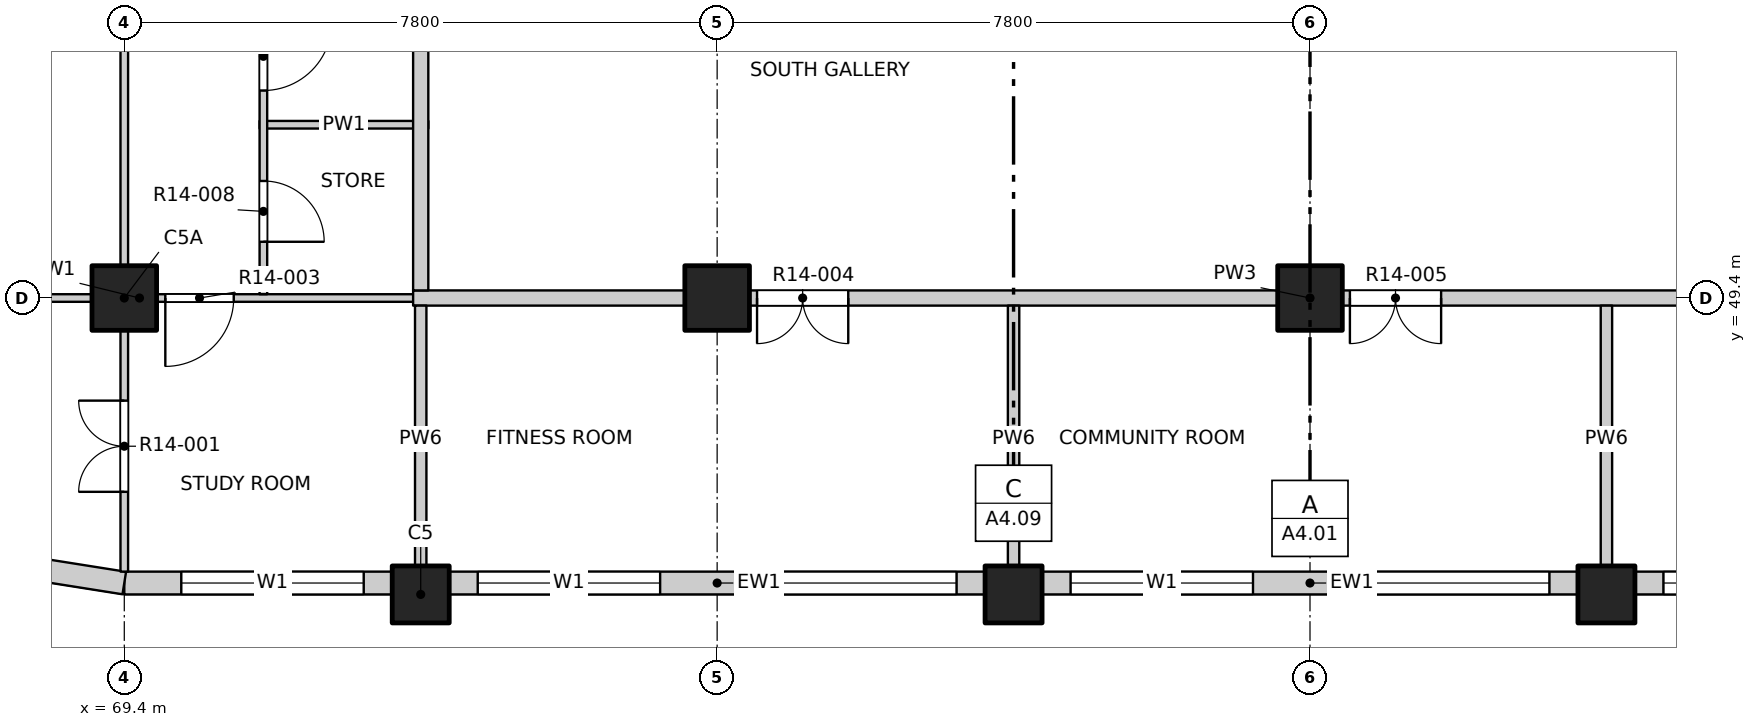
"""IFC4 building model, lengths in metres.
Left out: names, types, materials, properties, quantities, classifications, styles, units other than length and angle.
Written with IfcOpenShell. Run it as: python <this file> out.ifc"""

import sys

from ifc_helpers import new_model, si_unit, direction, frame, frame_2d, origin, origin_2d, place, context, subcontext, project, spatial, rectangle, extrude, element, fill, save


model = new_model("IFC4")
c1 = context("Model", 3, precision=1e-05, world=origin(), true_north=direction((0.0, 1.0)))
c2 = subcontext(c1, "Body", "Model", "MODEL_VIEW")
j1 = project(units=[si_unit("LENGTHUNIT", "METRE"), si_unit("PLANEANGLEUNIT", "RADIAN")], contexts=[c1])
p1 = place(None, origin())
s1 = spatial("IfcSite", under=j1, at=p1, CompositionType="ELEMENT")
p2 = place(p1, origin())
s2 = spatial("IfcBuilding", under=s1, at=p2, CompositionType="ELEMENT")
p3 = place(p2, frame((0.0, 0.0, 155.4)))
s3 = spatial("IfcBuildingStorey", under=s2, at=p3, CompositionType="ELEMENT", Elevation=155.4)
for number, where, z_axis, x_axis in (
    (1, (73.3, 45.5, -0.25), (0.0, 0.0, 1.0), (1.0, 0.0, 0.0)),
    (2, (81.1, 45.5, -0.25), (0.0, 0.0, 1.0), (1.0, 0.0, 0.0)),
    (3, (88.9, 45.5, -0.25), (0.0, 0.0, 1.0), (1.0, 0.0, 0.0)),
):
    element("IfcColumn", number, at=place(p3, frame(where, z_axis=z_axis, x_axis=x_axis)), inside=s3, PredefinedType="COLUMN", context=c2, shape_type="SweptSolid", body=[
        extrude(rectangle(XDim=0.75, YDim=0.75, at=origin_2d()), origin(), (0.0, 0.0, 1.0), 3.4),
    ])
for number, where, z_axis, x_axis in (
    (4, (69.4, 49.4, -0.25), (0.0, 0.0, 1.0), (1.0, 0.0, 0.0)),
    (5, (77.2, 49.4, -0.25), (0.0, 0.0, 1.0), (1.0, 0.0, 0.0)),
    (6, (85.0, 49.4, -0.25), (0.0, 0.0, 1.0), (1.0, 0.0, 0.0)),
):
    element("IfcColumn", number, at=place(p3, frame(where, z_axis=z_axis, x_axis=x_axis)), inside=s3, PredefinedType="COLUMN", context=c2, shape_type="SweptSolid", body=[
        extrude(rectangle(XDim=0.85, YDim=0.85, at=origin_2d()), origin(), (0.0, 0.0, 1.0), 3.4),
    ])
p4 = place(p3, frame((69.4, 45.65, 0.0), z_axis=(0.0, 0.0, 1.0), x_axis=(1.0, 0.0, 0.0)))
e7 = element("IfcWall", 7, at=p4, inside=s3, PredefinedType="SOLIDWALL", context=c2, shape_type="SweptSolid", body=[
    extrude(rectangle(XDim=3.525, YDim=0.3, at=frame_2d((1.763, 0.0))), origin(), (0.0, 0.0, 1.0), 2.7),
])
p5 = place(p4, frame((0.75, 0.0, 0.9)))
e8 = element("IfcOpeningElement", 8, at=p5, cuts=e7, PredefinedType="OPENING", context=c2, shape_type="SweptSolid", body=[
    extrude(rectangle(XDim=2.4, YDim=1.8, at=frame_2d((1.2, 0.9))), frame((0.0, 0.16, 0.0), z_axis=(0.0, -1.0, 0.0), x_axis=(1.0, 0.0, 0.0)), (0.0, 0.0, 1.0), 0.32),
])
p6 = place(p3, frame((73.675, 45.65, 0.0), z_axis=(0.0, 0.0, 1.0), x_axis=(1.0, 0.0, 0.0)))
e9 = element("IfcWall", 9, at=p6, inside=s3, PredefinedType="SOLIDWALL", context=c2, shape_type="SweptSolid", body=[
    extrude(rectangle(XDim=7.05, YDim=0.3, at=frame_2d((3.525, 0.0))), origin(), (0.0, 0.0, 1.0), 2.7),
])
p7 = place(p6, frame((0.375, 0.0, 0.9)))
e10 = element("IfcOpeningElement", 10, at=p7, cuts=e9, PredefinedType="OPENING", context=c2, shape_type="SweptSolid", body=[
    extrude(rectangle(XDim=2.4, YDim=1.8, at=frame_2d((1.2, 0.9))), frame((0.0, 0.16, 0.0), z_axis=(0.0, -1.0, 0.0), x_axis=(1.0, 0.0, 0.0)), (0.0, 0.0, 1.0), 0.32),
])
p8 = place(p6, frame((4.275, 0.0, 0.9)))
e11 = element("IfcOpeningElement", 11, at=p8, cuts=e9, PredefinedType="OPENING", context=c2, shape_type="SweptSolid", body=[
    extrude(rectangle(XDim=2.4, YDim=1.8, at=frame_2d((1.2, 0.9))), frame((0.0, 0.16, 0.0), z_axis=(0.0, -1.0, 0.0), x_axis=(1.0, 0.0, 0.0)), (0.0, 0.0, 1.0), 0.32),
])
p9 = place(p3, frame((81.475, 45.65, 0.0), z_axis=(0.0, 0.0, 1.0), x_axis=(1.0, 0.0, 0.0)))
e12 = element("IfcWall", 12, at=p9, inside=s3, PredefinedType="SOLIDWALL", context=c2, shape_type="SweptSolid", body=[
    extrude(rectangle(XDim=7.05, YDim=0.3, at=frame_2d((3.525, 0.0))), origin(), (0.0, 0.0, 1.0), 2.7),
])
p10 = place(p9, frame((0.375, 0.0, 0.9)))
e13 = element("IfcOpeningElement", 13, at=p10, cuts=e12, PredefinedType="OPENING", context=c2, shape_type="SweptSolid", body=[
    extrude(rectangle(XDim=2.4, YDim=1.8, at=frame_2d((1.2, 0.9))), frame((0.0, 0.16, 0.0), z_axis=(0.0, -1.0, 0.0), x_axis=(1.0, 0.0, 0.0)), (0.0, 0.0, 1.0), 0.32),
])
p11 = place(p9, frame((4.275, 0.0, 0.9)))
e14 = element("IfcOpeningElement", 14, at=p11, cuts=e12, PredefinedType="OPENING", context=c2, shape_type="SweptSolid", body=[
    extrude(rectangle(XDim=2.4, YDim=1.8, at=frame_2d((1.2, 0.9))), frame((0.0, 0.16, 0.0), z_axis=(0.0, -1.0, 0.0), x_axis=(1.0, 0.0, 0.0)), (0.0, 0.0, 1.0), 0.32),
])
p12 = place(p3, frame((89.275, 45.65, 0.0), z_axis=(0.0, 0.0, 1.0), x_axis=(1.0, 0.0, 0.0)))
e15 = element("IfcWall", 15, at=p12, inside=s3, PredefinedType="SOLIDWALL", context=c2, shape_type="SweptSolid", body=[
    extrude(rectangle(XDim=7.05, YDim=0.3, at=frame_2d((3.525, 0.0))), origin(), (0.0, 0.0, 1.0), 2.7),
])
p13 = place(p12, frame((0.375, 0.0, 0.9)))
e16 = element("IfcOpeningElement", 16, at=p13, cuts=e15, PredefinedType="OPENING", context=c2, shape_type="SweptSolid", body=[
    extrude(rectangle(XDim=2.4, YDim=1.8, at=frame_2d((1.2, 0.9))), frame((0.0, 0.16, 0.0), z_axis=(0.0, -1.0, 0.0), x_axis=(1.0, 0.0, 0.0)), (0.0, 0.0, 1.0), 0.32),
])
p14 = place(p12, frame((4.275, 0.0, 0.9)))
e17 = element("IfcOpeningElement", 17, at=p14, cuts=e15, PredefinedType="OPENING", context=c2, shape_type="SweptSolid", body=[
    extrude(rectangle(XDim=2.4, YDim=1.8, at=frame_2d((1.2, 0.9))), frame((0.0, 0.16, 0.0), z_axis=(0.0, -1.0, 0.0), x_axis=(1.0, 0.0, 0.0)), (0.0, 0.0, 1.0), 0.32),
])
p15 = place(p3, frame((68.241, 45.833, 0.0), z_axis=(0.0, 0.0, 1.0), x_axis=(0.987678452879, -0.156496880861, 0.0)))
e18 = element("IfcWall", 18, at=p15, inside=s3, PredefinedType="SOLIDWALL", context=c2, shape_type="SweptSolid", body=[
    extrude(rectangle(XDim=1.173, YDim=0.3, at=frame_2d((0.586, 0.0))), origin(), (0.0, 0.0, 1.0), 2.7),
])
p16 = place(p3, frame((65.8, 49.4, 0.0), z_axis=(0.0, 0.0, 1.0), x_axis=(1.0, 0.0, 0.0)))
e19 = element("IfcWall", 19, at=p16, inside=s3, PredefinedType="PARTITIONING", context=c2, shape_type="SweptSolid", body=[
    extrude(rectangle(XDim=7.6, YDim=0.1, at=frame_2d((3.8, 0.0))), origin(), (0.0, 0.0, 1.0), 3.15),
])
p17 = place(p16, frame((4.14, 0.0, 0.0)))
e20 = element("IfcOpeningElement", 20, at=p17, cuts=e19, PredefinedType="OPENING", context=c2, shape_type="SweptSolid", body=[
    extrude(rectangle(XDim=0.9, YDim=2.1, at=frame_2d((0.45, 1.05))), frame((0.0, 0.06, 0.0), z_axis=(0.0, -1.0, 0.0), x_axis=(1.0, 0.0, 0.0)), (0.0, 0.0, 1.0), 0.12),
])
p18 = place(p3, frame((73.2, 49.4, 0.0), z_axis=(0.0, 0.0, 1.0), x_axis=(1.0, 0.0, 0.0)))
e21 = element("IfcWall", 21, at=p18, inside=s3, PredefinedType="PARTITIONING", context=c2, shape_type="SweptSolid", body=[
    extrude(rectangle(XDim=23.6, YDim=0.2, at=frame_2d((11.8, 0.0))), origin(), (0.0, 0.0, 1.0), 3.15),
])
p19 = place(p18, frame((4.525, 0.0, 0.0)))
e22 = element("IfcOpeningElement", 22, at=p19, cuts=e21, PredefinedType="OPENING", context=c2, shape_type="SweptSolid", body=[
    extrude(rectangle(XDim=1.2, YDim=2.1, at=frame_2d((0.6, 1.05))), frame((0.0, 0.11, 0.0), z_axis=(0.0, -1.0, 0.0), x_axis=(1.0, 0.0, 0.0)), (0.0, 0.0, 1.0), 0.22),
])
p20 = place(p18, frame((12.325, 0.0, 0.0)))
e23 = element("IfcOpeningElement", 23, at=p20, cuts=e21, PredefinedType="OPENING", context=c2, shape_type="SweptSolid", body=[
    extrude(rectangle(XDim=1.2, YDim=2.1, at=frame_2d((0.6, 1.05))), frame((0.0, 0.11, 0.0), z_axis=(0.0, -1.0, 0.0), x_axis=(1.0, 0.0, 0.0)), (0.0, 0.0, 1.0), 0.22),
])
p21 = place(p18, frame((20.125, 0.0, 0.0)))
e24 = element("IfcOpeningElement", 24, at=p21, cuts=e21, PredefinedType="OPENING", context=c2, shape_type="SweptSolid", body=[
    extrude(rectangle(XDim=1.2, YDim=2.1, at=frame_2d((0.6, 1.05))), frame((0.0, 0.11, 0.0), z_axis=(0.0, -1.0, 0.0), x_axis=(1.0, 0.0, 0.0)), (0.0, 0.0, 1.0), 0.22),
])
p22 = place(p3, frame((71.18, 51.68, 0.0), z_axis=(0.0, 0.0, 1.0), x_axis=(1.0, 0.0, 0.0)))
e25 = element("IfcWall", 25, at=p22, inside=s3, PredefinedType="PARTITIONING", context=c2, shape_type="SweptSolid", body=[
    extrude(rectangle(XDim=2.22, YDim=0.1, at=frame_2d((1.11, 0.0))), origin(), (0.0, 0.0, 1.0), 3.15),
])
p23 = place(p3, frame((69.4, 45.8, 0.0), z_axis=(0.0, 0.0, 1.0), x_axis=(0.0, 1.0, 0.0)))
e26 = element("IfcWall", 26, at=p23, inside=s3, PredefinedType="PARTITIONING", context=c2, shape_type="SweptSolid", body=[
    extrude(rectangle(XDim=38.4, YDim=0.1, at=frame_2d((19.2, 0.0))), origin(), (0.0, 0.0, 1.0), 3.15),
])
p24 = place(p23, frame((1.05, 0.0, 0.0)))
e27 = element("IfcOpeningElement", 27, at=p24, cuts=e26, PredefinedType="OPENING", context=c2, shape_type="SweptSolid", body=[
    extrude(rectangle(XDim=1.2, YDim=2.1, at=frame_2d((0.6, 1.05))), frame((0.0, 0.06, 0.0), z_axis=(0.0, -1.0, 0.0), x_axis=(1.0, 0.0, 0.0)), (0.0, 0.0, 1.0), 0.12),
])
p25 = place(p23, frame((6.9, 0.0, 0.0)))
e28 = element("IfcOpeningElement", 28, at=p25, cuts=e26, PredefinedType="OPENING", context=c2, shape_type="SweptSolid", body=[
    extrude(rectangle(XDim=1.2, YDim=2.1, at=frame_2d((0.6, 1.05))), frame((0.0, 0.06, 0.0), z_axis=(0.0, -1.0, 0.0), x_axis=(1.0, 0.0, 0.0)), (0.0, 0.0, 1.0), 0.12),
])
p26 = place(p23, frame((12.9, 0.0, 0.0)))
e29 = element("IfcOpeningElement", 29, at=p26, cuts=e26, PredefinedType="OPENING", context=c2, shape_type="SweptSolid", body=[
    extrude(rectangle(XDim=0.9, YDim=2.1, at=frame_2d((0.45, 1.05))), frame((0.0, 0.06, 0.0), z_axis=(0.0, -1.0, 0.0), x_axis=(1.0, 0.0, 0.0)), (0.0, 0.0, 1.0), 0.12),
])
p27 = place(p23, frame((16.8, 0.0, 0.0)))
e30 = element("IfcOpeningElement", 30, at=p27, cuts=e26, PredefinedType="OPENING", context=c2, shape_type="SweptSolid", body=[
    extrude(rectangle(XDim=0.9, YDim=2.1, at=frame_2d((0.45, 1.05))), frame((0.0, 0.06, 0.0), z_axis=(0.0, -1.0, 0.0), x_axis=(1.0, 0.0, 0.0)), (0.0, 0.0, 1.0), 0.12),
])
p28 = place(p23, frame((20.7, 0.0, 0.0)))
e31 = element("IfcOpeningElement", 31, at=p28, cuts=e26, PredefinedType="OPENING", context=c2, shape_type="SweptSolid", body=[
    extrude(rectangle(XDim=0.9, YDim=2.1, at=frame_2d((0.45, 1.05))), frame((0.0, 0.06, 0.0), z_axis=(0.0, -1.0, 0.0), x_axis=(1.0, 0.0, 0.0)), (0.0, 0.0, 1.0), 0.12),
])
p29 = place(p23, frame((24.6, 0.0, 0.0)))
e32 = element("IfcOpeningElement", 32, at=p29, cuts=e26, PredefinedType="OPENING", context=c2, shape_type="SweptSolid", body=[
    extrude(rectangle(XDim=0.9, YDim=2.1, at=frame_2d((0.45, 1.05))), frame((0.0, 0.06, 0.0), z_axis=(0.0, -1.0, 0.0), x_axis=(1.0, 0.0, 0.0)), (0.0, 0.0, 1.0), 0.12),
])
p30 = place(p23, frame((28.5, 0.0, 0.0)))
e33 = element("IfcOpeningElement", 33, at=p30, cuts=e26, PredefinedType="OPENING", context=c2, shape_type="SweptSolid", body=[
    extrude(rectangle(XDim=0.9, YDim=2.1, at=frame_2d((0.45, 1.05))), frame((0.0, 0.06, 0.0), z_axis=(0.0, -1.0, 0.0), x_axis=(1.0, 0.0, 0.0)), (0.0, 0.0, 1.0), 0.12),
])
p31 = place(p23, frame((32.4, 0.0, 0.0)))
e34 = element("IfcOpeningElement", 34, at=p31, cuts=e26, PredefinedType="OPENING", context=c2, shape_type="SweptSolid", body=[
    extrude(rectangle(XDim=0.9, YDim=2.1, at=frame_2d((0.45, 1.05))), frame((0.0, 0.06, 0.0), z_axis=(0.0, -1.0, 0.0), x_axis=(1.0, 0.0, 0.0)), (0.0, 0.0, 1.0), 0.12),
])
p32 = place(p23, frame((36.15, 0.0, 0.0)))
e35 = element("IfcOpeningElement", 35, at=p32, cuts=e26, PredefinedType="OPENING", context=c2, shape_type="SweptSolid", body=[
    extrude(rectangle(XDim=1.2, YDim=2.1, at=frame_2d((0.6, 1.05))), frame((0.0, 0.06, 0.0), z_axis=(0.0, -1.0, 0.0), x_axis=(1.0, 0.0, 0.0)), (0.0, 0.0, 1.0), 0.12),
])
p33 = place(p3, frame((71.23, 49.45, 0.0), z_axis=(0.0, 0.0, 1.0), x_axis=(0.0, 1.0, 0.0)))
e36 = element("IfcWall", 36, at=p33, inside=s3, PredefinedType="PARTITIONING", context=c2, shape_type="SweptSolid", body=[
    extrude(rectangle(XDim=8.85, YDim=0.1, at=frame_2d((4.425, 0.0))), origin(), (0.0, 0.0, 1.0), 3.15),
])
p34 = place(p33, frame((0.69, 0.0, 0.0)))
e37 = element("IfcOpeningElement", 37, at=p34, cuts=e36, PredefinedType="OPENING", context=c2, shape_type="SweptSolid", body=[
    extrude(rectangle(XDim=0.8, YDim=2.1, at=frame_2d((0.4, 1.05))), frame((0.0, 0.06, 0.0), z_axis=(0.0, -1.0, 0.0), x_axis=(1.0, 0.0, 0.0)), (0.0, 0.0, 1.0), 0.12),
])
p35 = place(p33, frame((2.68, 0.0, 0.0)))
e38 = element("IfcOpeningElement", 38, at=p35, cuts=e36, PredefinedType="OPENING", context=c2, shape_type="SweptSolid", body=[
    extrude(rectangle(XDim=0.9, YDim=2.1, at=frame_2d((0.45, 1.05))), frame((0.0, 0.06, 0.0), z_axis=(0.0, -1.0, 0.0), x_axis=(1.0, 0.0, 0.0)), (0.0, 0.0, 1.0), 0.12),
])
p36 = place(p33, frame((4.965, 0.0, 0.0)))
e39 = element("IfcOpeningElement", 39, at=p36, cuts=e36, PredefinedType="OPENING", context=c2, shape_type="SweptSolid", body=[
    extrude(rectangle(XDim=0.9, YDim=2.1, at=frame_2d((0.45, 1.05))), frame((0.0, 0.06, 0.0), z_axis=(0.0, -1.0, 0.0), x_axis=(1.0, 0.0, 0.0)), (0.0, 0.0, 1.0), 0.12),
])
p37 = place(p33, frame((7.4, 0.0, 0.0)))
e40 = element("IfcOpeningElement", 40, at=p37, cuts=e36, PredefinedType="OPENING", context=c2, shape_type="SweptSolid", body=[
    extrude(rectangle(XDim=0.9, YDim=2.1, at=frame_2d((0.45, 1.05))), frame((0.0, 0.06, 0.0), z_axis=(0.0, -1.0, 0.0), x_axis=(1.0, 0.0, 0.0)), (0.0, 0.0, 1.0), 0.12),
])
p38 = place(p3, frame((73.3, 45.8, 0.0), z_axis=(0.0, 0.0, 1.0), x_axis=(0.0, 1.0, 0.0)))
e41 = element("IfcWall", 41, at=p38, inside=s3, PredefinedType="PARTITIONING", context=c2, shape_type="SweptSolid", body=[
    extrude(rectangle(XDim=3.5, YDim=0.15, at=frame_2d((1.75, 0.0))), origin(), (0.0, 0.0, 1.0), 3.15),
])
p39 = place(p3, frame((73.3, 49.5, 0.0), z_axis=(0.0, 0.0, 1.0), x_axis=(0.0, 1.0, 0.0)))
e42 = element("IfcWall", 42, at=p39, inside=s3, PredefinedType="PARTITIONING", context=c2, shape_type="SweptSolid", body=[
    extrude(rectangle(XDim=34.7, YDim=0.2, at=frame_2d((17.35, 0.0))), origin(), (0.0, 0.0, 1.0), 3.15),
])
p40 = place(p39, frame((10.125, 0.0, 0.0)))
e43 = element("IfcOpeningElement", 43, at=p40, cuts=e42, PredefinedType="OPENING", context=c2, shape_type="SweptSolid", body=[
    extrude(rectangle(XDim=1.0, YDim=2.1, at=frame_2d((0.5, 1.05))), frame((0.0, 0.11, 0.0), z_axis=(0.0, -1.0, 0.0), x_axis=(1.0, 0.0, 0.0)), (0.0, 0.0, 1.0), 0.22),
])
p41 = place(p39, frame((14.575, 0.0, 0.0)))
e44 = element("IfcOpeningElement", 44, at=p41, cuts=e42, PredefinedType="OPENING", context=c2, shape_type="SweptSolid", body=[
    extrude(rectangle(XDim=1.0, YDim=2.1, at=frame_2d((0.5, 1.05))), frame((0.0, 0.11, 0.0), z_axis=(0.0, -1.0, 0.0), x_axis=(1.0, 0.0, 0.0)), (0.0, 0.0, 1.0), 0.22),
])
p42 = place(p39, frame((26.575, 0.0, 0.0)))
e45 = element("IfcOpeningElement", 45, at=p42, cuts=e42, PredefinedType="OPENING", context=c2, shape_type="SweptSolid", body=[
    extrude(rectangle(XDim=1.0, YDim=2.1, at=frame_2d((0.5, 1.05))), frame((0.0, 0.11, 0.0), z_axis=(0.0, -1.0, 0.0), x_axis=(1.0, 0.0, 0.0)), (0.0, 0.0, 1.0), 0.22),
])
for number, where, z_axis, x_axis in (
    (46, (81.1, 45.8, 0.0), (0.0, 0.0, 1.0), (0.0, 1.0, 0.0)),
    (47, (88.9, 45.8, 0.0), (0.0, 0.0, 1.0), (0.0, 1.0, 0.0)),
):
    element("IfcWall", number, at=place(p3, frame(where, z_axis=z_axis, x_axis=x_axis)), inside=s3, PredefinedType="PARTITIONING", context=c2, shape_type="SweptSolid", body=[
        extrude(rectangle(XDim=3.5, YDim=0.15, at=frame_2d((1.75, 0.0))), origin(), (0.0, 0.0, 1.0), 2.55),
    ])
p43 = place(p5, origin())
e48 = element("IfcWindow", 48, at=p43, inside=s3, PartitioningType="DOUBLE_PANEL_VERTICAL", PredefinedType="WINDOW", context=c2, shape_type="SweptSolid", body=[
    extrude(rectangle(XDim=2.4, YDim=1.8, at=frame_2d((1.2, 0.9))), frame((0.0, 0.03, 0.0), z_axis=(0.0, -1.0, 0.0), x_axis=(1.0, 0.0, 0.0)), (0.0, 0.0, 1.0), 0.06),
])
fill(e8, e48)
p44 = place(p7, origin())
e49 = element("IfcWindow", 49, at=p44, inside=s3, PartitioningType="DOUBLE_PANEL_VERTICAL", PredefinedType="WINDOW", context=c2, shape_type="SweptSolid", body=[
    extrude(rectangle(XDim=2.4, YDim=1.8, at=frame_2d((1.2, 0.9))), frame((0.0, 0.03, 0.0), z_axis=(0.0, -1.0, 0.0), x_axis=(1.0, 0.0, 0.0)), (0.0, 0.0, 1.0), 0.06),
])
fill(e10, e49)
p45 = place(p8, origin())
e50 = element("IfcWindow", 50, at=p45, inside=s3, PartitioningType="DOUBLE_PANEL_VERTICAL", PredefinedType="WINDOW", context=c2, shape_type="SweptSolid", body=[
    extrude(rectangle(XDim=2.4, YDim=1.8, at=frame_2d((1.2, 0.9))), frame((0.0, 0.03, 0.0), z_axis=(0.0, -1.0, 0.0), x_axis=(1.0, 0.0, 0.0)), (0.0, 0.0, 1.0), 0.06),
])
fill(e11, e50)
p46 = place(p10, origin())
e51 = element("IfcWindow", 51, at=p46, inside=s3, PartitioningType="DOUBLE_PANEL_VERTICAL", PredefinedType="WINDOW", context=c2, shape_type="SweptSolid", body=[
    extrude(rectangle(XDim=2.4, YDim=1.8, at=frame_2d((1.2, 0.9))), frame((0.0, 0.03, 0.0), z_axis=(0.0, -1.0, 0.0), x_axis=(1.0, 0.0, 0.0)), (0.0, 0.0, 1.0), 0.06),
])
fill(e13, e51)
p47 = place(p11, origin())
e52 = element("IfcWindow", 52, at=p47, inside=s3, PartitioningType="DOUBLE_PANEL_VERTICAL", PredefinedType="WINDOW", context=c2, shape_type="SweptSolid", body=[
    extrude(rectangle(XDim=2.4, YDim=1.8, at=frame_2d((1.2, 0.9))), frame((0.0, 0.03, 0.0), z_axis=(0.0, -1.0, 0.0), x_axis=(1.0, 0.0, 0.0)), (0.0, 0.0, 1.0), 0.06),
])
fill(e14, e52)
p48 = place(p13, origin())
e53 = element("IfcWindow", 53, at=p48, inside=s3, PartitioningType="DOUBLE_PANEL_VERTICAL", PredefinedType="WINDOW", context=c2, shape_type="SweptSolid", body=[
    extrude(rectangle(XDim=2.4, YDim=1.8, at=frame_2d((1.2, 0.9))), frame((0.0, 0.03, 0.0), z_axis=(0.0, -1.0, 0.0), x_axis=(1.0, 0.0, 0.0)), (0.0, 0.0, 1.0), 0.06),
])
fill(e16, e53)
p49 = place(p24, origin())
e54 = element("IfcDoor", 54, at=p49, inside=s3, OperationType="DOUBLE_DOOR_SINGLE_SWING", PredefinedType="DOOR", context=c2, shape_type="SweptSolid", body=[
    extrude(rectangle(XDim=1.2, YDim=2.1, at=frame_2d((0.6, 1.05))), frame((0.0, 0.025, 0.0), z_axis=(0.0, -1.0, 0.0), x_axis=(1.0, 0.0, 0.0)), (0.0, 0.0, 1.0), 0.05),
])
fill(e27, e54)
p50 = place(p17, origin())
e55 = element("IfcDoor", 55, at=p50, inside=s3, OperationType="SINGLE_SWING_RIGHT", PredefinedType="DOOR", context=c2, shape_type="SweptSolid", body=[
    extrude(rectangle(XDim=0.9, YDim=2.1, at=frame_2d((0.45, 1.05))), frame((0.0, 0.025, 0.0), z_axis=(0.0, -1.0, 0.0), x_axis=(1.0, 0.0, 0.0)), (0.0, 0.0, 1.0), 0.05),
])
fill(e20, e55)
p51 = place(p19, origin())
e56 = element("IfcDoor", 56, at=p51, inside=s3, OperationType="DOUBLE_DOOR_SINGLE_SWING", PredefinedType="DOOR", context=c2, shape_type="SweptSolid", body=[
    extrude(rectangle(XDim=1.2, YDim=2.1, at=frame_2d((0.6, 1.05))), frame((0.0, 0.025, 0.0), z_axis=(0.0, -1.0, 0.0), x_axis=(1.0, 0.0, 0.0)), (0.0, 0.0, 1.0), 0.05),
])
fill(e22, e56)
p52 = place(p20, origin())
e57 = element("IfcDoor", 57, at=p52, inside=s3, OperationType="DOUBLE_DOOR_SINGLE_SWING", PredefinedType="DOOR", context=c2, shape_type="SweptSolid", body=[
    extrude(rectangle(XDim=1.2, YDim=2.1, at=frame_2d((0.6, 1.05))), frame((0.0, 0.025, 0.0), z_axis=(0.0, -1.0, 0.0), x_axis=(1.0, 0.0, 0.0)), (0.0, 0.0, 1.0), 0.05),
])
fill(e23, e57)
p53 = place(p34, origin())
e58 = element("IfcDoor", 58, at=p53, inside=s3, OperationType="SINGLE_SWING_RIGHT", PredefinedType="DOOR", context=c2, shape_type="SweptSolid", body=[
    extrude(rectangle(XDim=0.8, YDim=2.1, at=frame_2d((0.4, 1.05))), frame((0.0, 0.025, 0.0), z_axis=(0.0, -1.0, 0.0), x_axis=(1.0, 0.0, 0.0)), (0.0, 0.0, 1.0), 0.05),
])
fill(e37, e58)
p54 = place(p35, origin())
e59 = element("IfcDoor", 59, at=p54, inside=s3, OperationType="SINGLE_SWING_LEFT", PredefinedType="DOOR", context=c2, shape_type="SweptSolid", body=[
    extrude(rectangle(XDim=0.9, YDim=2.1, at=frame_2d((0.45, 1.05))), frame((0.0, 0.025, 0.0), z_axis=(0.0, -1.0, 0.0), x_axis=(1.0, 0.0, 0.0)), (0.0, 0.0, 1.0), 0.05),
])
fill(e38, e59)
save(model, sys.argv[1])
